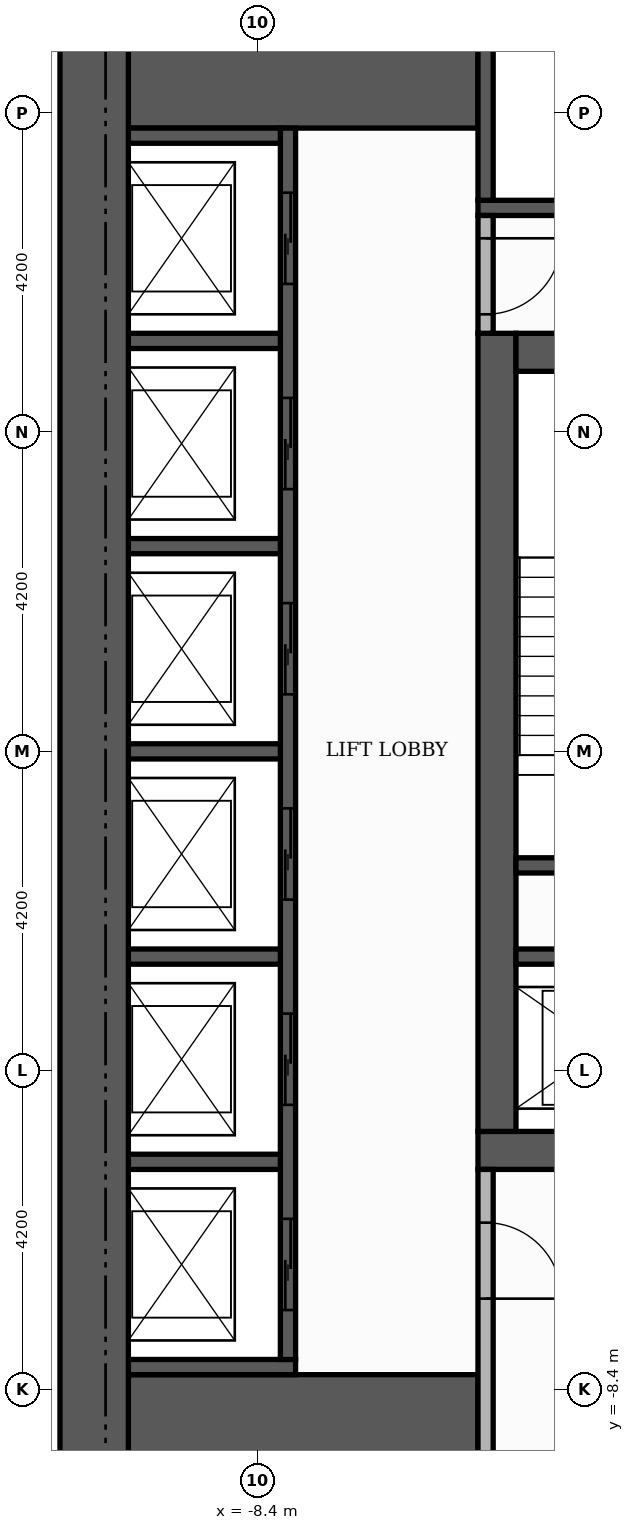
"""IFC4 building model, lengths in metres.
Left out: names, types, materials, properties, quantities, classifications, styles, units other than length and angle.
Written with IfcOpenShell. Run it as: python <this file> out.ifc"""

import sys

from ifc_helpers import new_model, si_unit, direction, frame, frame_2d, origin, place, context, subcontext, project, spatial, rectangle, extrude, element, fill, save


model = new_model("IFC4")
c1 = context("Model", 3, precision=1e-05, world=origin(), true_north=direction((0.0, 1.0)))
c2 = subcontext(c1, "Body", "Model", "MODEL_VIEW")
j1 = project(units=[si_unit("LENGTHUNIT", "METRE"), si_unit("PLANEANGLEUNIT", "RADIAN")], contexts=[c1])
p1 = place(None, origin())
s1 = spatial("IfcSite", under=j1, at=p1, CompositionType="ELEMENT")
p2 = place(p1, origin())
s2 = spatial("IfcBuilding", under=s1, at=p2, CompositionType="ELEMENT")
p3 = place(p2, frame((0.0, 0.0, 122.1)))
s3 = spatial("IfcBuildingStorey", under=s2, at=p3, CompositionType="ELEMENT", Elevation=122.1)
p4 = place(p3, frame((-5.5, -5.25, 0.0), z_axis=(0.0, 0.0, 1.0), x_axis=(1.0, 0.0, 0.0)))
e1 = element("IfcWall", 1, at=p4, inside=s3, PredefinedType="SHEAR", context=c2, shape_type="SweptSolid", body=[
    extrude(rectangle(XDim=11.0, YDim=0.5, at=frame_2d((5.5, 0.0))), origin(), (0.0, 0.0, 1.0), 3.4),
])
p5 = place(p4, frame((4.9, 0.0, 0.0)))
e2 = element("IfcOpeningElement", 2, at=p5, cuts=e1, PredefinedType="OPENING", context=c2, shape_type="SweptSolid", body=[
    extrude(rectangle(XDim=1.2, YDim=2.1, at=frame_2d((0.6, 1.05))), frame((0.0, 0.26, 0.0), z_axis=(0.0, -1.0, 0.0), x_axis=(1.0, 0.0, 0.0)), (0.0, 0.0, 1.0), 0.52),
])
p6 = place(p3, frame((-5.25, -5.0, 0.0), z_axis=(0.0, 0.0, 1.0), x_axis=(0.0, 1.0, 0.0)))
e3 = element("IfcWall", 3, at=p6, inside=s3, PredefinedType="SHEAR", context=c2, shape_type="SweptSolid", body=[
    extrude(rectangle(XDim=10.5, YDim=0.5, at=frame_2d((5.25, 0.0))), origin(), (0.0, 0.0, 1.0), 3.4),
])
p7 = place(p3, frame((-5.0, 5.25, 0.0), z_axis=(0.0, 0.0, 1.0), x_axis=(1.0, 0.0, 0.0)))
e4 = element("IfcWall", 4, at=p7, inside=s3, PredefinedType="SHEAR", context=c2, shape_type="SweptSolid", body=[
    extrude(rectangle(XDim=10.0, YDim=0.5, at=frame_2d((5.0, 0.0))), origin(), (0.0, 0.0, 1.0), 3.4),
])
p8 = place(p7, frame((4.4, 0.0, 0.0)))
e5 = element("IfcOpeningElement", 5, at=p8, cuts=e4, PredefinedType="OPENING", context=c2, shape_type="SweptSolid", body=[
    extrude(rectangle(XDim=1.2, YDim=2.1, at=frame_2d((0.6, 1.05))), frame((0.0, 0.26, 0.0), z_axis=(0.0, -1.0, 0.0), x_axis=(1.0, 0.0, 0.0)), (0.0, 0.0, 1.0), 0.52),
])
for number, where, z_axis, x_axis in (
    (6, (-10.1, -9.15, 0.0), (0.0, 0.0, 1.0), (1.0, 0.0, 0.0)),
    (7, (-10.1, 9.15, 0.0), (0.0, 0.0, 1.0), (1.0, 0.0, 0.0)),
):
    element("IfcWall", number, at=place(p3, frame(where, z_axis=z_axis, x_axis=x_axis)), inside=s3, PredefinedType="SHEAR", context=c2, shape_type="SweptSolid", body=[
        extrude(rectangle(XDim=4.6, YDim=1.9, at=frame_2d((2.3, 0.0))), origin(), (0.0, 0.0, 1.0), 3.4),
    ])
p9 = place(p3, frame((-5.0, -1.5, 0.0), z_axis=(0.0, 0.0, 1.0), x_axis=(1.0, 0.0, 0.0)))
e8 = element("IfcWall", 8, at=p9, inside=s3, PredefinedType="SHEAR", context=c2, shape_type="SweptSolid", body=[
    extrude(rectangle(XDim=3.05, YDim=0.2, at=frame_2d((1.525, 0.0))), origin(), (0.0, 0.0, 1.0), 3.4),
])
p10 = place(p3, frame((-5.5, 7.15, 0.0), z_axis=(0.0, 0.0, 1.0), x_axis=(1.0, 0.0, 0.0)))
e9 = element("IfcWall", 9, at=p10, inside=s3, PredefinedType="SHEAR", context=c2, shape_type="SweptSolid", body=[
    extrude(rectangle(XDim=6.8, YDim=0.2, at=frame_2d((3.4, 0.0))), origin(), (0.0, 0.0, 1.0), 3.4),
])
p11 = place(p3, frame((-5.4, 7.25, 0.0), z_axis=(0.0, 0.0, 1.0), x_axis=(0.0, 1.0, 0.0)))
e10 = element("IfcWall", 10, at=p11, inside=s3, PredefinedType="SHEAR", context=c2, shape_type="SweptSolid", body=[
    extrude(rectangle(XDim=2.85, YDim=0.2, at=frame_2d((1.425, 0.0))), origin(), (0.0, 0.0, 1.0), 3.4),
])
p12 = place(p3, frame((-10.1, -8.1, 0.0), z_axis=(0.0, 0.0, 1.0), x_axis=(1.0, 0.0, 0.0)))
e11 = element("IfcWall", 11, at=p12, inside=s3, PredefinedType="SHEAR", context=c2, shape_type="SweptSolid", body=[
    extrude(rectangle(XDim=2.2, YDim=0.2, at=frame_2d((1.1, 0.0))), origin(), (0.0, 0.0, 1.0), 3.4),
])
p13 = place(p3, frame((-8.0, -8.0, 0.0), z_axis=(0.0, 0.0, 1.0), x_axis=(0.0, 1.0, 0.0)))
e12 = element("IfcWall", 12, at=p13, inside=s3, PredefinedType="SHEAR", context=c2, shape_type="SweptSolid", body=[
    extrude(rectangle(XDim=16.2, YDim=0.2, at=frame_2d((8.1, 0.0))), origin(), (0.0, 0.0, 1.0), 3.4),
])
p14 = place(p13, frame((0.65, 0.0, 0.0)))
e13 = element("IfcOpeningElement", 13, at=p14, cuts=e12, PredefinedType="OPENING", context=c2, shape_type="SweptSolid", body=[
    extrude(rectangle(XDim=1.2, YDim=2.1, at=frame_2d((0.6, 1.05))), frame((0.0, 0.11, 0.0), z_axis=(0.0, -1.0, 0.0), x_axis=(1.0, 0.0, 0.0)), (0.0, 0.0, 1.0), 0.22),
])
p15 = place(p13, frame((3.35, 0.0, 0.0)))
e14 = element("IfcOpeningElement", 14, at=p15, cuts=e12, PredefinedType="OPENING", context=c2, shape_type="SweptSolid", body=[
    extrude(rectangle(XDim=1.2, YDim=2.1, at=frame_2d((0.6, 1.05))), frame((0.0, 0.11, 0.0), z_axis=(0.0, -1.0, 0.0), x_axis=(1.0, 0.0, 0.0)), (0.0, 0.0, 1.0), 0.22),
])
p16 = place(p13, frame((6.05, 0.0, 0.0)))
e15 = element("IfcOpeningElement", 15, at=p16, cuts=e12, PredefinedType="OPENING", context=c2, shape_type="SweptSolid", body=[
    extrude(rectangle(XDim=1.2, YDim=2.1, at=frame_2d((0.6, 1.05))), frame((0.0, 0.11, 0.0), z_axis=(0.0, -1.0, 0.0), x_axis=(1.0, 0.0, 0.0)), (0.0, 0.0, 1.0), 0.22),
])
p17 = place(p13, frame((8.75, 0.0, 0.0)))
e16 = element("IfcOpeningElement", 16, at=p17, cuts=e12, PredefinedType="OPENING", context=c2, shape_type="SweptSolid", body=[
    extrude(rectangle(XDim=1.2, YDim=2.1, at=frame_2d((0.6, 1.05))), frame((0.0, 0.11, 0.0), z_axis=(0.0, -1.0, 0.0), x_axis=(1.0, 0.0, 0.0)), (0.0, 0.0, 1.0), 0.22),
])
p18 = place(p13, frame((11.45, 0.0, 0.0)))
e17 = element("IfcOpeningElement", 17, at=p18, cuts=e12, PredefinedType="OPENING", context=c2, shape_type="SweptSolid", body=[
    extrude(rectangle(XDim=1.2, YDim=2.1, at=frame_2d((0.6, 1.05))), frame((0.0, 0.11, 0.0), z_axis=(0.0, -1.0, 0.0), x_axis=(1.0, 0.0, 0.0)), (0.0, 0.0, 1.0), 0.22),
])
p19 = place(p13, frame((14.15, 0.0, 0.0)))
e18 = element("IfcOpeningElement", 18, at=p19, cuts=e12, PredefinedType="OPENING", context=c2, shape_type="SweptSolid", body=[
    extrude(rectangle(XDim=1.2, YDim=2.1, at=frame_2d((0.6, 1.05))), frame((0.0, 0.11, 0.0), z_axis=(0.0, -1.0, 0.0), x_axis=(1.0, 0.0, 0.0)), (0.0, 0.0, 1.0), 0.22),
])
for number, where, z_axis, x_axis in (
    (19, (-10.1, -5.4, 0.0), (0.0, 0.0, 1.0), (1.0, 0.0, 0.0)),
    (20, (-10.1, -2.7, 0.0), (0.0, 0.0, 1.0), (1.0, 0.0, 0.0)),
):
    element("IfcWall", number, at=place(p3, frame(where, z_axis=z_axis, x_axis=x_axis)), inside=s3, PredefinedType="SHEAR", context=c2, shape_type="SweptSolid", body=[
        extrude(rectangle(XDim=2.0, YDim=0.2, at=frame_2d((1.0, 0.0))), origin(), (0.0, 0.0, 1.0), 3.4),
    ])
p20 = place(p3, frame((-5.0, -2.7, 0.0), z_axis=(0.0, 0.0, 1.0), x_axis=(1.0, 0.0, 0.0)))
e21 = element("IfcWall", 21, at=p20, inside=s3, PredefinedType="SHEAR", context=c2, shape_type="SweptSolid", body=[
    extrude(rectangle(XDim=2.85, YDim=0.2, at=frame_2d((1.425, 0.0))), origin(), (0.0, 0.0, 1.0), 3.4),
])
for number, where, z_axis, x_axis in (
    (22, (-10.1, 0.0, 0.0), (0.0, 0.0, 1.0), (1.0, 0.0, 0.0)),
    (23, (-10.1, 2.7, 0.0), (0.0, 0.0, 1.0), (1.0, 0.0, 0.0)),
    (24, (-10.1, 5.4, 0.0), (0.0, 0.0, 1.0), (1.0, 0.0, 0.0)),
    (25, (-10.1, 8.1, 0.0), (0.0, 0.0, 1.0), (1.0, 0.0, 0.0)),
):
    element("IfcWall", number, at=place(p3, frame(where, z_axis=z_axis, x_axis=x_axis)), inside=s3, PredefinedType="SHEAR", context=c2, shape_type="SweptSolid", body=[
        extrude(rectangle(XDim=2.0, YDim=0.2, at=frame_2d((1.0, 0.0))), origin(), (0.0, 0.0, 1.0), 3.4),
    ])
p21 = place(p3, frame((-10.55, -10.1, 0.0), z_axis=(0.0, 0.0, 1.0), x_axis=(0.0, 1.0, 0.0)))
e26 = element("IfcWall", 26, at=p21, inside=s3, PredefinedType="SHEAR", context=c2, shape_type="SweptSolid", body=[
    extrude(rectangle(XDim=20.2, YDim=0.9, at=frame_2d((10.1, 0.0))), origin(), (0.0, 0.0, 1.0), 3.4),
])
p22 = place(p3, frame((-5.4, -10.1, 0.0), z_axis=(0.0, 0.0, 1.0), x_axis=(0.0, 1.0, 0.0)))
e27 = element("IfcWall", 27, at=p22, inside=s3, PredefinedType="PARTITIONING", context=c2, shape_type="SweptSolid", body=[
    extrude(rectangle(XDim=4.6, YDim=0.2, at=frame_2d((2.3, 0.0))), origin(), (0.0, 0.0, 1.0), 3.4),
])
p23 = place(p22, frame((2.9, 0.0, 0.0)))
e28 = element("IfcOpeningElement", 28, at=p23, cuts=e27, PredefinedType="OPENING", context=c2, shape_type="SweptSolid", body=[
    extrude(rectangle(XDim=1.0, YDim=2.1, at=frame_2d((0.5, 1.05))), frame((0.0, 0.11, 0.0), z_axis=(0.0, -1.0, 0.0), x_axis=(1.0, 0.0, 0.0)), (0.0, 0.0, 1.0), 0.22),
])
p24 = place(p3, frame((-5.4, 5.5, 0.0), z_axis=(0.0, 0.0, 1.0), x_axis=(0.0, 1.0, 0.0)))
e29 = element("IfcWall", 29, at=p24, inside=s3, PredefinedType="PARTITIONING", context=c2, shape_type="SweptSolid", body=[
    extrude(rectangle(XDim=1.55, YDim=0.2, at=frame_2d((0.775, 0.0))), origin(), (0.0, 0.0, 1.0), 3.4),
])
p25 = place(p24, frame((0.25, 0.0, 0.0)))
e30 = element("IfcOpeningElement", 30, at=p25, cuts=e29, PredefinedType="OPENING", context=c2, shape_type="SweptSolid", body=[
    extrude(rectangle(XDim=1.0, YDim=2.1, at=frame_2d((0.5, 1.05))), frame((0.0, 0.11, 0.0), z_axis=(0.0, -1.0, 0.0), x_axis=(1.0, 0.0, 0.0)), (0.0, 0.0, 1.0), 0.22),
])
p26 = place(p14, origin())
e31 = element("IfcDoor", 31, at=p26, inside=s3, OperationType="SLIDING_TO_LEFT", PredefinedType="DOOR", context=c2, shape_type="SweptSolid", body=[
    extrude(rectangle(XDim=1.2, YDim=2.1, at=frame_2d((0.6, 1.05))), frame((0.0, 0.025, 0.0), z_axis=(0.0, -1.0, 0.0), x_axis=(1.0, 0.0, 0.0)), (0.0, 0.0, 1.0), 0.05),
])
fill(e13, e31)
p27 = place(p15, origin())
e32 = element("IfcDoor", 32, at=p27, inside=s3, OperationType="SLIDING_TO_LEFT", PredefinedType="DOOR", context=c2, shape_type="SweptSolid", body=[
    extrude(rectangle(XDim=1.2, YDim=2.1, at=frame_2d((0.6, 1.05))), frame((0.0, 0.025, 0.0), z_axis=(0.0, -1.0, 0.0), x_axis=(1.0, 0.0, 0.0)), (0.0, 0.0, 1.0), 0.05),
])
fill(e14, e32)
p28 = place(p16, origin())
e33 = element("IfcDoor", 33, at=p28, inside=s3, OperationType="SLIDING_TO_LEFT", PredefinedType="DOOR", context=c2, shape_type="SweptSolid", body=[
    extrude(rectangle(XDim=1.2, YDim=2.1, at=frame_2d((0.6, 1.05))), frame((0.0, 0.025, 0.0), z_axis=(0.0, -1.0, 0.0), x_axis=(1.0, 0.0, 0.0)), (0.0, 0.0, 1.0), 0.05),
])
fill(e15, e33)
p29 = place(p17, origin())
e34 = element("IfcDoor", 34, at=p29, inside=s3, OperationType="SLIDING_TO_LEFT", PredefinedType="DOOR", context=c2, shape_type="SweptSolid", body=[
    extrude(rectangle(XDim=1.2, YDim=2.1, at=frame_2d((0.6, 1.05))), frame((0.0, 0.025, 0.0), z_axis=(0.0, -1.0, 0.0), x_axis=(1.0, 0.0, 0.0)), (0.0, 0.0, 1.0), 0.05),
])
fill(e16, e34)
p30 = place(p18, origin())
e35 = element("IfcDoor", 35, at=p30, inside=s3, OperationType="SLIDING_TO_LEFT", PredefinedType="DOOR", context=c2, shape_type="SweptSolid", body=[
    extrude(rectangle(XDim=1.2, YDim=2.1, at=frame_2d((0.6, 1.05))), frame((0.0, 0.025, 0.0), z_axis=(0.0, -1.0, 0.0), x_axis=(1.0, 0.0, 0.0)), (0.0, 0.0, 1.0), 0.05),
])
fill(e17, e35)
p31 = place(p19, origin())
e36 = element("IfcDoor", 36, at=p31, inside=s3, OperationType="SLIDING_TO_LEFT", PredefinedType="DOOR", context=c2, shape_type="SweptSolid", body=[
    extrude(rectangle(XDim=1.2, YDim=2.1, at=frame_2d((0.6, 1.05))), frame((0.0, 0.025, 0.0), z_axis=(0.0, -1.0, 0.0), x_axis=(1.0, 0.0, 0.0)), (0.0, 0.0, 1.0), 0.05),
])
fill(e18, e36)
p32 = place(p25, frame((1.0, 0.0, 0.0), z_axis=(0.0, 0.0, 1.0), x_axis=(-1.0, 0.0, 0.0)))
e37 = element("IfcDoor", 37, at=p32, inside=s3, OperationType="SINGLE_SWING_RIGHT", PredefinedType="DOOR", context=c2, shape_type="SweptSolid", body=[
    extrude(rectangle(XDim=1.0, YDim=2.1, at=frame_2d((0.5, 1.05))), frame((0.0, 0.025, 0.0), z_axis=(0.0, -1.0, 0.0), x_axis=(1.0, 0.0, 0.0)), (0.0, 0.0, 1.0), 0.05),
])
fill(e30, e37)
p33 = place(p23, frame((1.0, 0.0, 0.0), z_axis=(0.0, 0.0, 1.0), x_axis=(-1.0, 0.0, 0.0)))
e38 = element("IfcDoor", 38, at=p33, inside=s3, OperationType="SINGLE_SWING_LEFT", PredefinedType="DOOR", context=c2, shape_type="SweptSolid", body=[
    extrude(rectangle(XDim=1.0, YDim=2.1, at=frame_2d((0.5, 1.05))), frame((0.0, 0.025, 0.0), z_axis=(0.0, -1.0, 0.0), x_axis=(1.0, 0.0, 0.0)), (0.0, 0.0, 1.0), 0.05),
])
fill(e28, e38)
save(model, sys.argv[1])
